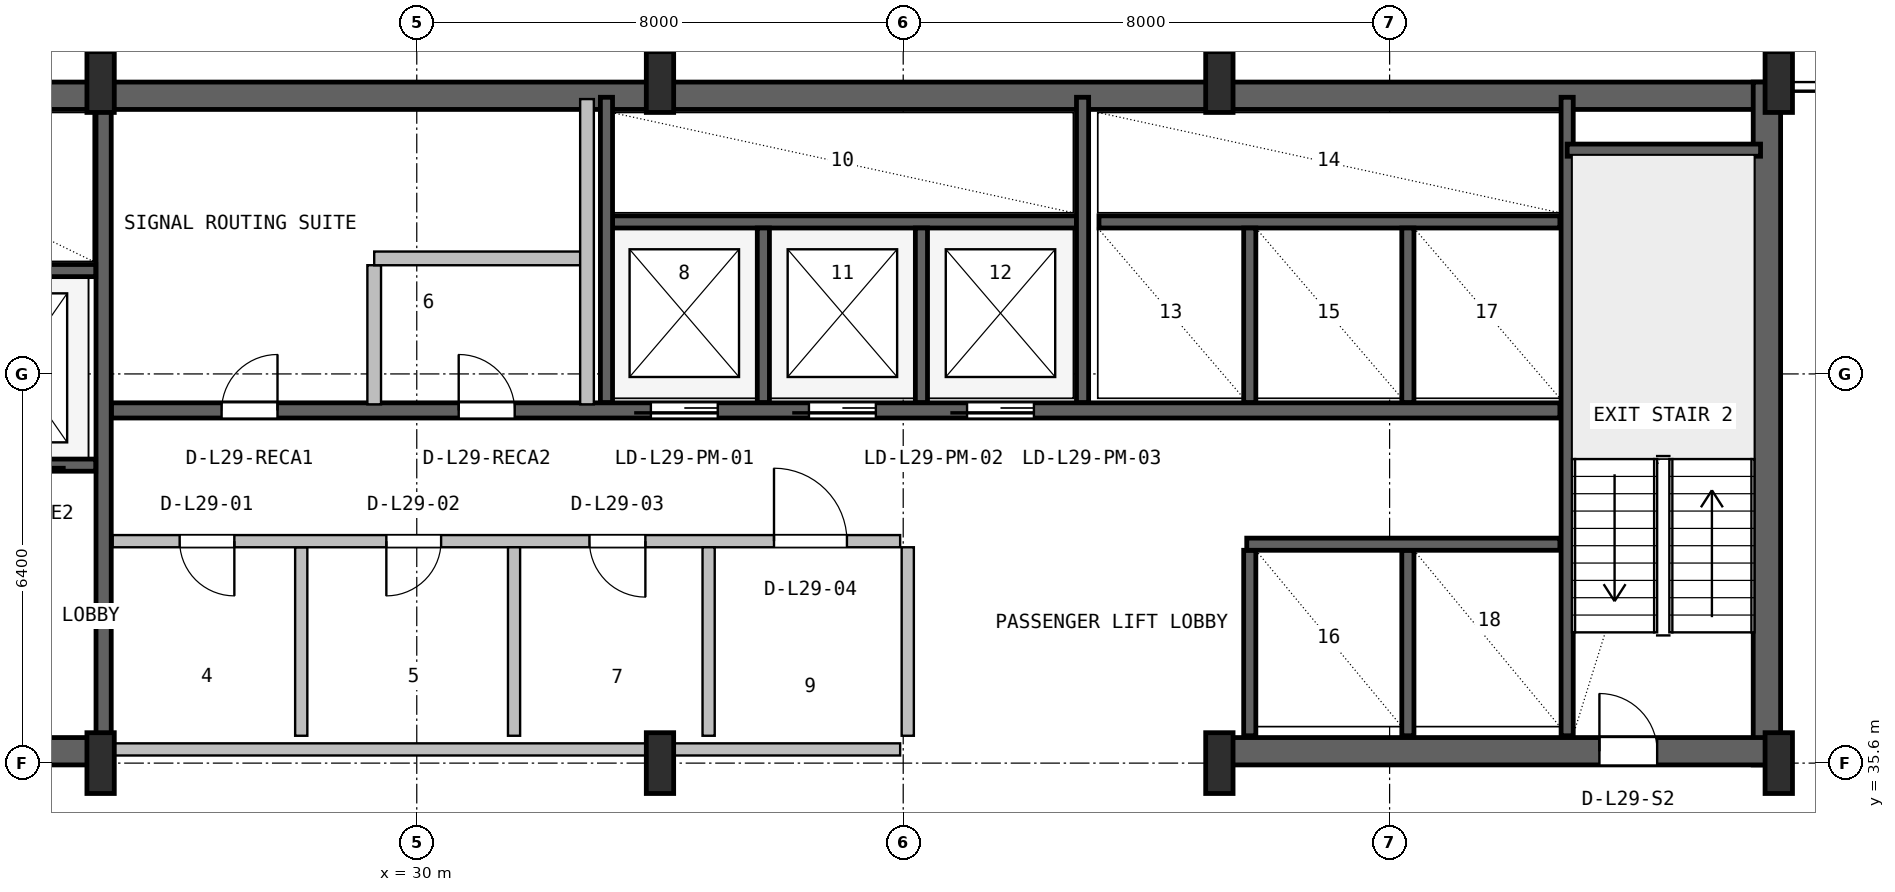
"""IFC4 building model, lengths in metres.
Left out: names, types, materials, properties, quantities, classifications, styles, units other than length and angle.
Written with IfcOpenShell. Run it as: python <this file> out.ifc"""

import sys

from ifc_helpers import new_model, si_unit, direction, frame, frame_2d, origin, origin_2d, place, context, subcontext, project, spatial, rectangle, i_section, extrude, source, transform, mapped, element, fill, save


model = new_model("IFC4")
c1 = context("Model", 3, precision=1e-05, world=origin(), true_north=direction((0.0, 1.0)))
c2 = subcontext(c1, "Body", "Model", "MODEL_VIEW")
j1 = project(units=[si_unit("LENGTHUNIT", "METRE"), si_unit("PLANEANGLEUNIT", "RADIAN")], contexts=[c1])
p1 = place(None, origin())
s1 = spatial("IfcSite", under=j1, at=p1, CompositionType="ELEMENT")
p2 = place(p1, origin())
s2 = spatial("IfcBuilding", under=s1, at=p2, CompositionType="ELEMENT")
p3 = place(p2, frame((0.0, 0.0, 122.0)))
s3 = spatial("IfcBuildingStorey", under=s2, at=p3, CompositionType="ELEMENT", Elevation=122.0)
p4 = place(p3, frame((15.6, 46.575, 0.0), z_axis=(0.0, 0.0, 1.0), x_axis=(1.0, 0.0, 0.0)))
e1 = element("IfcWall", 1, at=p4, inside=s3, PredefinedType="SHEAR", context=c2, shape_type="SweptSolid", body=[
    extrude(rectangle(XDim=36.8, YDim=0.45, at=frame_2d((18.4, 0.0))), origin(), (0.0, 0.0, 1.0), 3.55),
])
p5 = place(p3, frame((52.205, 35.57, 0.0), z_axis=(0.0, 0.0, 1.0), x_axis=(0.0, 1.0, 0.0)))
e2 = element("IfcWall", 2, at=p5, inside=s3, PredefinedType="SHEAR", context=c2, shape_type="SweptSolid", body=[
    extrude(rectangle(XDim=11.23, YDim=0.45, at=frame_2d((5.615, 0.0))), origin(), (0.0, 0.0, 1.0), 3.55),
])
p6 = place(p3, frame((15.57, 35.795, 0.0), z_axis=(0.0, 0.0, 1.0), x_axis=(1.0, 0.0, 0.0)))
e3 = element("IfcWall", 3, at=p6, inside=s3, PredefinedType="SHEAR", context=c2, shape_type="SweptSolid", body=[
    extrude(rectangle(XDim=9.23, YDim=0.45, at=frame_2d((4.615, 0.0))), origin(), (0.0, 0.0, 1.0), 3.55),
])
p7 = place(p6, frame((5.4, 0.0, 0.0)))
e4 = element("IfcOpeningElement", 4, at=p7, cuts=e3, PredefinedType="OPENING", context=c2, shape_type="SweptSolid", body=[
    extrude(rectangle(XDim=1.0, YDim=2.1, at=frame_2d((0.5, 1.05))), frame((0.0, 0.235, 0.0), z_axis=(0.0, -1.0, 0.0), x_axis=(1.0, 0.0, 0.0)), (0.0, 0.0, 1.0), 0.47),
])
p8 = place(p3, frame((43.2, 35.795, 0.0), z_axis=(0.0, 0.0, 1.0), x_axis=(1.0, 0.0, 0.0)))
e5 = element("IfcWall", 5, at=p8, inside=s3, PredefinedType="SHEAR", context=c2, shape_type="SweptSolid", body=[
    extrude(rectangle(XDim=9.23, YDim=0.45, at=frame_2d((4.615, 0.0))), origin(), (0.0, 0.0, 1.0), 3.55),
])
p9 = place(p8, frame((6.25, 0.0, 0.0)))
e6 = element("IfcOpeningElement", 6, at=p9, cuts=e5, PredefinedType="OPENING", context=c2, shape_type="SweptSolid", body=[
    extrude(rectangle(XDim=0.95, YDim=2.1, at=frame_2d((0.475, 1.05))), frame((0.0, 0.235, 0.0), z_axis=(0.0, -1.0, 0.0), x_axis=(1.0, 0.0, 0.0)), (0.0, 0.0, 1.0), 0.47),
])
m1 = source(origin(), c2, "Body", "SweptSolid", [
    extrude(i_section(OverallWidth=0.45, OverallDepth=1.0, WebThickness=0.016, FlangeThickness=0.03, FilletRadius=0.016, at=origin_2d()), origin(), (0.0, 0.0, 1.0), 3.8),
])
for number, where, z_axis, x_axis in (
    (7, (24.8, 35.6, 0.0), (0.0, 0.0, 1.0), (1.0, 0.0, 0.0)),
    (8, (24.8, 46.8, 0.0), (0.0, 0.0, 1.0), (1.0, 0.0, 0.0)),
    (9, (34.0, 35.6, 0.0), (0.0, 0.0, 1.0), (1.0, 0.0, 0.0)),
    (10, (34.0, 46.8, 0.0), (0.0, 0.0, 1.0), (1.0, 0.0, 0.0)),
    (11, (43.2, 35.6, 0.0), (0.0, 0.0, 1.0), (1.0, 0.0, 0.0)),
    (12, (43.2, 46.8, 0.0), (0.0, 0.0, 1.0), (1.0, 0.0, 0.0)),
    (13, (52.4, 35.6, 0.0), (0.0, 0.0, 1.0), (1.0, 0.0, 0.0)),
    (14, (52.4, 46.8, 0.0), (0.0, 0.0, 1.0), (1.0, 0.0, 0.0)),
):
    element("IfcColumn", number, at=place(p3, frame(where, z_axis=z_axis, x_axis=x_axis)), inside=s3, PredefinedType="COLUMN", context=c2, shape_type="MappedRepresentation", body=[
        mapped(m1, transform((0.0, 0.0, 0.0), x_axis=(1.0, 0.0, 0.0), y_axis=(0.0, 1.0, 0.0), z_axis=(0.0, 0.0, 1.0), scale=1.0)),
    ])
p10 = place(p3, frame((24.85, 36.05, 0.0), z_axis=(0.0, 0.0, 1.0), x_axis=(0.0, 1.0, 0.0)))
e15 = element("IfcWall", 15, at=p10, inside=s3, PredefinedType="SHEAR", context=c2, shape_type="SweptSolid", body=[
    extrude(rectangle(XDim=10.45, YDim=0.25, at=frame_2d((5.225, 0.0))), origin(), (0.0, 0.0, 1.0), 3.55),
])
p11 = place(p3, frame((19.2, 40.5, 0.0), z_axis=(0.0, 0.0, 1.0), x_axis=(1.0, 0.0, 0.0)))
e16 = element("IfcWall", 16, at=p11, inside=s3, PredefinedType="SHEAR", context=c2, shape_type="SweptSolid", body=[
    extrude(rectangle(XDim=5.52, YDim=0.2, at=frame_2d((2.76, 0.0))), origin(), (0.0, 0.0, 1.0), 3.55),
])
p12 = place(p11, frame((1.05, 0.0, 0.0)))
e17 = element("IfcOpeningElement", 17, at=p12, cuts=e16, PredefinedType="OPENING", context=c2, shape_type="SweptSolid", body=[
    extrude(rectangle(XDim=1.1, YDim=2.18, at=frame_2d((0.55, 1.09))), frame((0.0, 0.11, 0.0), z_axis=(0.0, -1.0, 0.0), x_axis=(1.0, 0.0, 0.0)), (0.0, 0.0, 1.0), 0.22),
])
p13 = place(p11, frame((3.65, 0.0, 0.0)))
e18 = element("IfcOpeningElement", 18, at=p13, cuts=e16, PredefinedType="OPENING", context=c2, shape_type="SweptSolid", body=[
    extrude(rectangle(XDim=1.1, YDim=2.18, at=frame_2d((0.55, 1.09))), frame((0.0, 0.11, 0.0), z_axis=(0.0, -1.0, 0.0), x_axis=(1.0, 0.0, 0.0)), (0.0, 0.0, 1.0), 0.22),
])
p14 = place(p3, frame((19.2, 43.7, 0.0), z_axis=(0.0, 0.0, 1.0), x_axis=(1.0, 0.0, 0.0)))
e19 = element("IfcWall", 19, at=p14, inside=s3, PredefinedType="SHEAR", context=c2, shape_type="SweptSolid", body=[
    extrude(rectangle(XDim=5.52, YDim=0.2, at=frame_2d((2.76, 0.0))), origin(), (0.0, 0.0, 1.0), 3.55),
])
p15 = place(p3, frame((48.92, 36.05, 0.0), z_axis=(0.0, 0.0, 1.0), x_axis=(0.0, 1.0, 0.0)))
e20 = element("IfcWall", 20, at=p15, inside=s3, PredefinedType="SHEAR", context=c2, shape_type="SweptSolid", body=[
    extrude(rectangle(XDim=10.5, YDim=0.2, at=frame_2d((5.25, 0.0))), origin(), (0.0, 0.0, 1.0), 3.55),
])
p16 = place(p3, frame((48.92, 45.68, 0.0), z_axis=(0.0, 0.0, 1.0), x_axis=(1.0, 0.0, 0.0)))
e21 = element("IfcWall", 21, at=p16, inside=s3, PredefinedType="SHEAR", context=c2, shape_type="SweptSolid", body=[
    extrude(rectangle(XDim=3.18, YDim=0.2, at=frame_2d((1.59, 0.0))), origin(), (0.0, 0.0, 1.0), 3.55),
])
p17 = place(p3, frame((24.98, 41.4, 0.0), z_axis=(0.0, 0.0, 1.0), x_axis=(1.0, 0.0, 0.0)))
e22 = element("IfcWall", 22, at=p17, inside=s3, PredefinedType="SHEAR", context=c2, shape_type="SweptSolid", body=[
    extrude(rectangle(XDim=23.82, YDim=0.25, at=frame_2d((11.91, 0.0))), origin(), (0.0, 0.0, 1.0), 3.55),
])
p18 = place(p17, frame((8.87, 0.0, 0.0)))
e23 = element("IfcOpeningElement", 23, at=p18, cuts=e22, PredefinedType="OPENING", context=c2, shape_type="SweptSolid", body=[
    extrude(rectangle(XDim=1.1, YDim=2.18, at=frame_2d((0.55, 1.09))), frame((0.0, 0.135, 0.0), z_axis=(0.0, -1.0, 0.0), x_axis=(1.0, 0.0, 0.0)), (0.0, 0.0, 1.0), 0.27),
])
p19 = place(p17, frame((11.47, 0.0, 0.0)))
e24 = element("IfcOpeningElement", 24, at=p19, cuts=e22, PredefinedType="OPENING", context=c2, shape_type="SweptSolid", body=[
    extrude(rectangle(XDim=1.1, YDim=2.18, at=frame_2d((0.55, 1.09))), frame((0.0, 0.135, 0.0), z_axis=(0.0, -1.0, 0.0), x_axis=(1.0, 0.0, 0.0)), (0.0, 0.0, 1.0), 0.27),
])
p20 = place(p17, frame((14.07, 0.0, 0.0)))
e25 = element("IfcOpeningElement", 25, at=p20, cuts=e22, PredefinedType="OPENING", context=c2, shape_type="SweptSolid", body=[
    extrude(rectangle(XDim=1.1, YDim=2.18, at=frame_2d((0.55, 1.09))), frame((0.0, 0.135, 0.0), z_axis=(0.0, -1.0, 0.0), x_axis=(1.0, 0.0, 0.0)), (0.0, 0.0, 1.0), 0.27),
])
p21 = place(p17, frame((1.81, 0.0, 0.0)))
e26 = element("IfcOpeningElement", 26, at=p21, cuts=e22, PredefinedType="OPENING", context=c2, shape_type="SweptSolid", body=[
    extrude(rectangle(XDim=0.92, YDim=2.08, at=frame_2d((0.46, 1.04))), frame((0.0, 0.135, 0.0), z_axis=(0.0, -1.0, 0.0), x_axis=(1.0, 0.0, 0.0)), (0.0, 0.0, 1.0), 0.27),
])
p22 = place(p17, frame((5.71, 0.0, 0.0)))
e27 = element("IfcOpeningElement", 27, at=p22, cuts=e22, PredefinedType="OPENING", context=c2, shape_type="SweptSolid", body=[
    extrude(rectangle(XDim=0.92, YDim=2.08, at=frame_2d((0.46, 1.04))), frame((0.0, 0.135, 0.0), z_axis=(0.0, -1.0, 0.0), x_axis=(1.0, 0.0, 0.0)), (0.0, 0.0, 1.0), 0.27),
])
p23 = place(p3, frame((33.22, 44.5, 0.0), z_axis=(0.0, 0.0, 1.0), x_axis=(1.0, 0.0, 0.0)))
e28 = element("IfcWall", 28, at=p23, inside=s3, PredefinedType="SHEAR", context=c2, shape_type="SweptSolid", body=[
    extrude(rectangle(XDim=7.63, YDim=0.2, at=frame_2d((3.815, 0.0))), origin(), (0.0, 0.0, 1.0), 3.55),
])
p24 = place(p3, frame((33.12, 41.53, 0.0), z_axis=(0.0, 0.0, 1.0), x_axis=(0.0, 1.0, 0.0)))
e29 = element("IfcWall", 29, at=p24, inside=s3, PredefinedType="SHEAR", context=c2, shape_type="SweptSolid", body=[
    extrude(rectangle(XDim=5.02, YDim=0.2, at=frame_2d((2.51, 0.0))), origin(), (0.0, 0.0, 1.0), 3.55),
])
for number, where, z_axis, x_axis in (
    (30, (35.7, 41.53, 0.0), (0.0, 0.0, 1.0), (0.0, 1.0, 0.0)),
    (31, (38.3, 41.53, 0.0), (0.0, 0.0, 1.0), (0.0, 1.0, 0.0)),
):
    element("IfcWall", number, at=place(p3, frame(where, z_axis=z_axis, x_axis=x_axis)), inside=s3, PredefinedType="SHEAR", context=c2, shape_type="SweptSolid", body=[
        extrude(rectangle(XDim=2.87, YDim=0.2, at=frame_2d((1.435, 0.0))), origin(), (0.0, 0.0, 1.0), 3.55),
    ])
p25 = place(p3, frame((40.95, 41.53, 0.0), z_axis=(0.0, 0.0, 1.0), x_axis=(0.0, 1.0, 0.0)))
e32 = element("IfcWall", 32, at=p25, inside=s3, PredefinedType="SHEAR", context=c2, shape_type="SweptSolid", body=[
    extrude(rectangle(XDim=5.02, YDim=0.2, at=frame_2d((2.51, 0.0))), origin(), (0.0, 0.0, 1.0), 3.55),
])
p26 = place(p3, frame((41.22, 44.5, 0.0), z_axis=(0.0, 0.0, 1.0), x_axis=(1.0, 0.0, 0.0)))
e33 = element("IfcWall", 33, at=p26, inside=s3, PredefinedType="SHEAR", context=c2, shape_type="SweptSolid", body=[
    extrude(rectangle(XDim=7.58, YDim=0.2, at=frame_2d((3.79, 0.0))), origin(), (0.0, 0.0, 1.0), 3.55),
])
for number, where, z_axis, x_axis in (
    (34, (43.7, 41.53, 0.0), (0.0, 0.0, 1.0), (0.0, 1.0, 0.0)),
    (35, (46.3, 41.53, 0.0), (0.0, 0.0, 1.0), (0.0, 1.0, 0.0)),
):
    element("IfcWall", number, at=place(p3, frame(where, z_axis=z_axis, x_axis=x_axis)), inside=s3, PredefinedType="SHEAR", context=c2, shape_type="SweptSolid", body=[
        extrude(rectangle(XDim=2.87, YDim=0.2, at=frame_2d((1.435, 0.0))), origin(), (0.0, 0.0, 1.0), 3.55),
    ])
for number, where, z_axis, x_axis in (
    (36, (43.7, 36.05, 0.0), (0.0, 0.0, 1.0), (0.0, 1.0, 0.0)),
    (37, (46.3, 36.05, 0.0), (0.0, 0.0, 1.0), (0.0, 1.0, 0.0)),
):
    element("IfcWall", number, at=place(p3, frame(where, z_axis=z_axis, x_axis=x_axis)), inside=s3, PredefinedType="SHEAR", context=c2, shape_type="SweptSolid", body=[
        extrude(rectangle(XDim=3.05, YDim=0.2, at=frame_2d((1.525, 0.0))), origin(), (0.0, 0.0, 1.0), 3.55),
    ])
p27 = place(p3, frame((43.65, 39.2, 0.0), z_axis=(0.0, 0.0, 1.0), x_axis=(1.0, 0.0, 0.0)))
e38 = element("IfcWall", 38, at=p27, inside=s3, PredefinedType="SHEAR", context=c2, shape_type="SweptSolid", body=[
    extrude(rectangle(XDim=5.15, YDim=0.2, at=frame_2d((2.575, 0.0))), origin(), (0.0, 0.0, 1.0), 3.55),
])
p28 = place(p3, frame((25.0, 35.825, 0.0), z_axis=(0.0, 0.0, 1.0), x_axis=(1.0, 0.0, 0.0)))
e39 = element("IfcWall", 39, at=p28, inside=s3, PredefinedType="SOLIDWALL", context=c2, shape_type="SweptSolid", body=[
    extrude(rectangle(XDim=12.95, YDim=0.2, at=frame_2d((6.475, 0.0))), origin(), (0.0, 0.0, 1.0), 2.325),
])
p29 = place(p3, frame((28.1, 36.05, 0.0), z_axis=(0.0, 0.0, 1.0), x_axis=(0.0, 1.0, 0.0)))
e40 = element("IfcWall", 40, at=p29, inside=s3, PredefinedType="PLUMBINGWALL", context=c2, shape_type="SweptSolid", body=[
    extrude(rectangle(XDim=3.1, YDim=0.2, at=frame_2d((1.55, 0.0))), origin(), (0.0, 0.0, 1.0), 3.53),
])
p30 = place(p3, frame((25.0, 39.25, 0.0), z_axis=(0.0, 0.0, 1.0), x_axis=(1.0, 0.0, 0.0)))
e41 = element("IfcWall", 41, at=p30, inside=s3, PredefinedType="SOLIDWALL", context=c2, shape_type="SweptSolid", body=[
    extrude(rectangle(XDim=12.95, YDim=0.2, at=frame_2d((6.475, 0.0))), origin(), (0.0, 0.0, 1.0), 3.53),
])
p31 = place(p30, frame((1.1, 0.0, 0.0)))
e42 = element("IfcOpeningElement", 42, at=p31, cuts=e41, PredefinedType="OPENING", context=c2, shape_type="SweptSolid", body=[
    extrude(rectangle(XDim=0.9, YDim=2.06, at=frame_2d((0.45, 1.03))), frame((0.0, 0.11, 0.0), z_axis=(0.0, -1.0, 0.0), x_axis=(1.0, 0.0, 0.0)), (0.0, 0.0, 1.0), 0.22),
])
p32 = place(p30, frame((4.5, 0.0, 0.0)))
e43 = element("IfcOpeningElement", 43, at=p32, cuts=e41, PredefinedType="OPENING", context=c2, shape_type="SweptSolid", body=[
    extrude(rectangle(XDim=0.9, YDim=2.06, at=frame_2d((0.45, 1.03))), frame((0.0, 0.11, 0.0), z_axis=(0.0, -1.0, 0.0), x_axis=(1.0, 0.0, 0.0)), (0.0, 0.0, 1.0), 0.22),
])
p33 = place(p30, frame((7.84, 0.0, 0.0)))
e44 = element("IfcOpeningElement", 44, at=p33, cuts=e41, PredefinedType="OPENING", context=c2, shape_type="SweptSolid", body=[
    extrude(rectangle(XDim=0.92, YDim=2.08, at=frame_2d((0.46, 1.04))), frame((0.0, 0.11, 0.0), z_axis=(0.0, -1.0, 0.0), x_axis=(1.0, 0.0, 0.0)), (0.0, 0.0, 1.0), 0.22),
])
p34 = place(p30, frame((10.875, 0.0, 0.0)))
e45 = element("IfcOpeningElement", 45, at=p34, cuts=e41, PredefinedType="OPENING", context=c2, shape_type="SweptSolid", body=[
    extrude(rectangle(XDim=1.2, YDim=2.1, at=frame_2d((0.6, 1.05))), frame((0.0, 0.11, 0.0), z_axis=(0.0, -1.0, 0.0), x_axis=(1.0, 0.0, 0.0)), (0.0, 0.0, 1.0), 0.22),
])
p35 = place(p3, frame((31.6, 36.05, 0.0), z_axis=(0.0, 0.0, 1.0), x_axis=(0.0, 1.0, 0.0)))
e46 = element("IfcWall", 46, at=p35, inside=s3, PredefinedType="PLUMBINGWALL", context=c2, shape_type="SweptSolid", body=[
    extrude(rectangle(XDim=3.1, YDim=0.2, at=frame_2d((1.55, 0.0))), origin(), (0.0, 0.0, 1.0), 3.53),
])
for number, where, z_axis, x_axis in (
    (47, (34.8, 36.05, 0.0), (0.0, 0.0, 1.0), (0.0, 1.0, 0.0)),
    (48, (38.075, 36.05, 0.0), (0.0, 0.0, 1.0), (0.0, 1.0, 0.0)),
):
    element("IfcWall", number, at=place(p3, frame(where, z_axis=z_axis, x_axis=x_axis)), inside=s3, PredefinedType="SOLIDWALL", context=c2, shape_type="SweptSolid", body=[
        extrude(rectangle(XDim=3.1, YDim=0.2, at=frame_2d((1.55, 0.0))), origin(), (0.0, 0.0, 1.0), 3.53),
    ])
p36 = place(p3, frame((29.3, 41.5, 0.0), z_axis=(0.0, 0.0, 1.0), x_axis=(0.0, 1.0, 0.0)))
e49 = element("IfcWall", 49, at=p36, inside=s3, PredefinedType="PARTITIONING", context=c2, shape_type="SweptSolid", body=[
    extrude(rectangle(XDim=2.288, YDim=0.225, at=frame_2d((1.144, 0.0))), origin(), (0.0, 0.0, 1.0), 3.53),
])
p37 = place(p3, frame((29.3, 43.9, 0.0), z_axis=(0.0, 0.0, 1.0), x_axis=(1.0, 0.0, 0.0)))
e50 = element("IfcWall", 50, at=p37, inside=s3, PredefinedType="PARTITIONING", context=c2, shape_type="SweptSolid", body=[
    extrude(rectangle(XDim=3.5, YDim=0.225, at=frame_2d((1.75, 0.0))), origin(), (0.0, 0.0, 1.0), 3.53),
])
p38 = place(p3, frame((32.8, 41.5, 0.0), z_axis=(0.0, 0.0, 1.0), x_axis=(0.0, 1.0, 0.0)))
e51 = element("IfcWall", 51, at=p38, inside=s3, PredefinedType="PARTITIONING", context=c2, shape_type="SweptSolid", body=[
    extrude(rectangle(XDim=5.02, YDim=0.225, at=frame_2d((2.51, 0.0))), origin(), (0.0, 0.0, 1.0), 3.53),
])
m2 = source(origin(), c2, "Body", "SweptSolid", [
    extrude(rectangle(XDim=0.95, YDim=2.1, at=frame_2d((0.475, 1.05))), frame((0.0, 0.025, 0.0), z_axis=(0.0, -1.0, 0.0), x_axis=(1.0, 0.0, 0.0)), (0.0, 0.0, 1.0), 0.05),
])
p39 = place(p9, origin())
e52 = element("IfcDoor", 52, at=p39, inside=s3, OperationType="SINGLE_SWING_LEFT", PredefinedType="DOOR", context=c2, shape_type="MappedRepresentation", body=[
    mapped(m2, transform((0.0, 0.0, 0.0), x_axis=(1.0, 0.0, 0.0), y_axis=(0.0, 1.0, 0.0), z_axis=(0.0, 0.0, 1.0), scale=1.0)),
])
fill(e6, e52)
m3 = source(origin(), c2, "Body", "SweptSolid", [
    extrude(rectangle(XDim=1.1, YDim=2.18, at=frame_2d((0.55, 1.09))), frame((0.0, 0.025, 0.0), z_axis=(0.0, -1.0, 0.0), x_axis=(1.0, 0.0, 0.0)), (0.0, 0.0, 1.0), 0.05),
])
p40 = place(p18, frame((1.1, 0.0, 0.0), z_axis=(0.0, 0.0, 1.0), x_axis=(-1.0, 0.0, 0.0)))
e53 = element("IfcDoor", 53, at=p40, inside=s3, OperationType="SLIDING_TO_LEFT", PredefinedType="DOOR", context=c2, shape_type="MappedRepresentation", body=[
    mapped(m3, transform((0.0, 0.0, 0.0), x_axis=(1.0, 0.0, 0.0), y_axis=(0.0, 1.0, 0.0), z_axis=(0.0, 0.0, 1.0), scale=1.0)),
])
fill(e23, e53)
p41 = place(p19, frame((1.1, 0.0, 0.0), z_axis=(0.0, 0.0, 1.0), x_axis=(-1.0, 0.0, 0.0)))
e54 = element("IfcDoor", 54, at=p41, inside=s3, OperationType="SLIDING_TO_LEFT", PredefinedType="DOOR", context=c2, shape_type="MappedRepresentation", body=[
    mapped(m3, transform((0.0, 0.0, 0.0), x_axis=(1.0, 0.0, 0.0), y_axis=(0.0, 1.0, 0.0), z_axis=(0.0, 0.0, 1.0), scale=1.0)),
])
fill(e24, e54)
p42 = place(p20, frame((1.1, 0.0, 0.0), z_axis=(0.0, 0.0, 1.0), x_axis=(-1.0, 0.0, 0.0)))
e55 = element("IfcDoor", 55, at=p42, inside=s3, OperationType="SLIDING_TO_LEFT", PredefinedType="DOOR", context=c2, shape_type="MappedRepresentation", body=[
    mapped(m3, transform((0.0, 0.0, 0.0), x_axis=(1.0, 0.0, 0.0), y_axis=(0.0, 1.0, 0.0), z_axis=(0.0, 0.0, 1.0), scale=1.0)),
])
fill(e25, e55)
m4 = source(origin(), c2, "Body", "SweptSolid", [
    extrude(rectangle(XDim=0.92, YDim=2.08, at=frame_2d((0.46, 1.04))), frame((0.0, 0.025, 0.0), z_axis=(0.0, -1.0, 0.0), x_axis=(1.0, 0.0, 0.0)), (0.0, 0.0, 1.0), 0.05),
])
p43 = place(p21, origin())
e56 = element("IfcDoor", 56, at=p43, inside=s3, OperationType="SINGLE_SWING_RIGHT", PredefinedType="DOOR", context=c2, shape_type="MappedRepresentation", body=[
    mapped(m4, transform((0.0, 0.0, 0.0), x_axis=(1.0, 0.0, 0.0), y_axis=(0.0, 1.0, 0.0), z_axis=(0.0, 0.0, 1.0), scale=1.0)),
])
fill(e26, e56)
p44 = place(p22, origin())
e57 = element("IfcDoor", 57, at=p44, inside=s3, OperationType="SINGLE_SWING_LEFT", PredefinedType="DOOR", context=c2, shape_type="MappedRepresentation", body=[
    mapped(m4, transform((0.0, 0.0, 0.0), x_axis=(1.0, 0.0, 0.0), y_axis=(0.0, 1.0, 0.0), z_axis=(0.0, 0.0, 1.0), scale=1.0)),
])
fill(e27, e57)
m5 = source(origin(), c2, "Body", "SweptSolid", [
    extrude(rectangle(XDim=0.9, YDim=2.06, at=frame_2d((0.45, 1.03))), frame((0.0, 0.025, 0.0), z_axis=(0.0, -1.0, 0.0), x_axis=(1.0, 0.0, 0.0)), (0.0, 0.0, 1.0), 0.05),
])
p45 = place(p31, frame((0.9, 0.0, 0.0), z_axis=(0.0, 0.0, 1.0), x_axis=(-1.0, 0.0, 0.0)))
e58 = element("IfcDoor", 58, at=p45, inside=s3, OperationType="SINGLE_SWING_RIGHT", PredefinedType="DOOR", context=c2, shape_type="MappedRepresentation", body=[
    mapped(m5, transform((0.0, 0.0, 0.0), x_axis=(1.0, 0.0, 0.0), y_axis=(0.0, 1.0, 0.0), z_axis=(0.0, 0.0, 1.0), scale=1.0)),
])
fill(e42, e58)
p46 = place(p32, frame((0.9, 0.0, 0.0), z_axis=(0.0, 0.0, 1.0), x_axis=(-1.0, 0.0, 0.0)))
e59 = element("IfcDoor", 59, at=p46, inside=s3, OperationType="SINGLE_SWING_LEFT", PredefinedType="DOOR", context=c2, shape_type="MappedRepresentation", body=[
    mapped(m5, transform((0.0, 0.0, 0.0), x_axis=(1.0, 0.0, 0.0), y_axis=(0.0, 1.0, 0.0), z_axis=(0.0, 0.0, 1.0), scale=1.0)),
])
fill(e43, e59)
p47 = place(p33, frame((0.92, 0.0, 0.0), z_axis=(0.0, 0.0, 1.0), x_axis=(-1.0, 0.0, 0.0)))
e60 = element("IfcDoor", 60, at=p47, inside=s3, OperationType="SINGLE_SWING_RIGHT", PredefinedType="DOOR", context=c2, shape_type="MappedRepresentation", body=[
    mapped(m4, transform((0.0, 0.0, 0.0), x_axis=(1.0, 0.0, 0.0), y_axis=(0.0, 1.0, 0.0), z_axis=(0.0, 0.0, 1.0), scale=1.0)),
])
fill(e44, e60)
m6 = source(origin(), c2, "Body", "SweptSolid", [
    extrude(rectangle(XDim=1.2, YDim=2.1, at=frame_2d((0.6, 1.05))), frame((0.0, 0.025, 0.0), z_axis=(0.0, -1.0, 0.0), x_axis=(1.0, 0.0, 0.0)), (0.0, 0.0, 1.0), 0.05),
])
p48 = place(p34, origin())
e61 = element("IfcDoor", 61, at=p48, inside=s3, OperationType="SINGLE_SWING_LEFT", PredefinedType="DOOR", context=c2, shape_type="MappedRepresentation", body=[
    mapped(m6, transform((0.0, 0.0, 0.0), x_axis=(1.0, 0.0, 0.0), y_axis=(0.0, 1.0, 0.0), z_axis=(0.0, 0.0, 1.0), scale=1.0)),
])
fill(e45, e61)
save(model, sys.argv[1])
